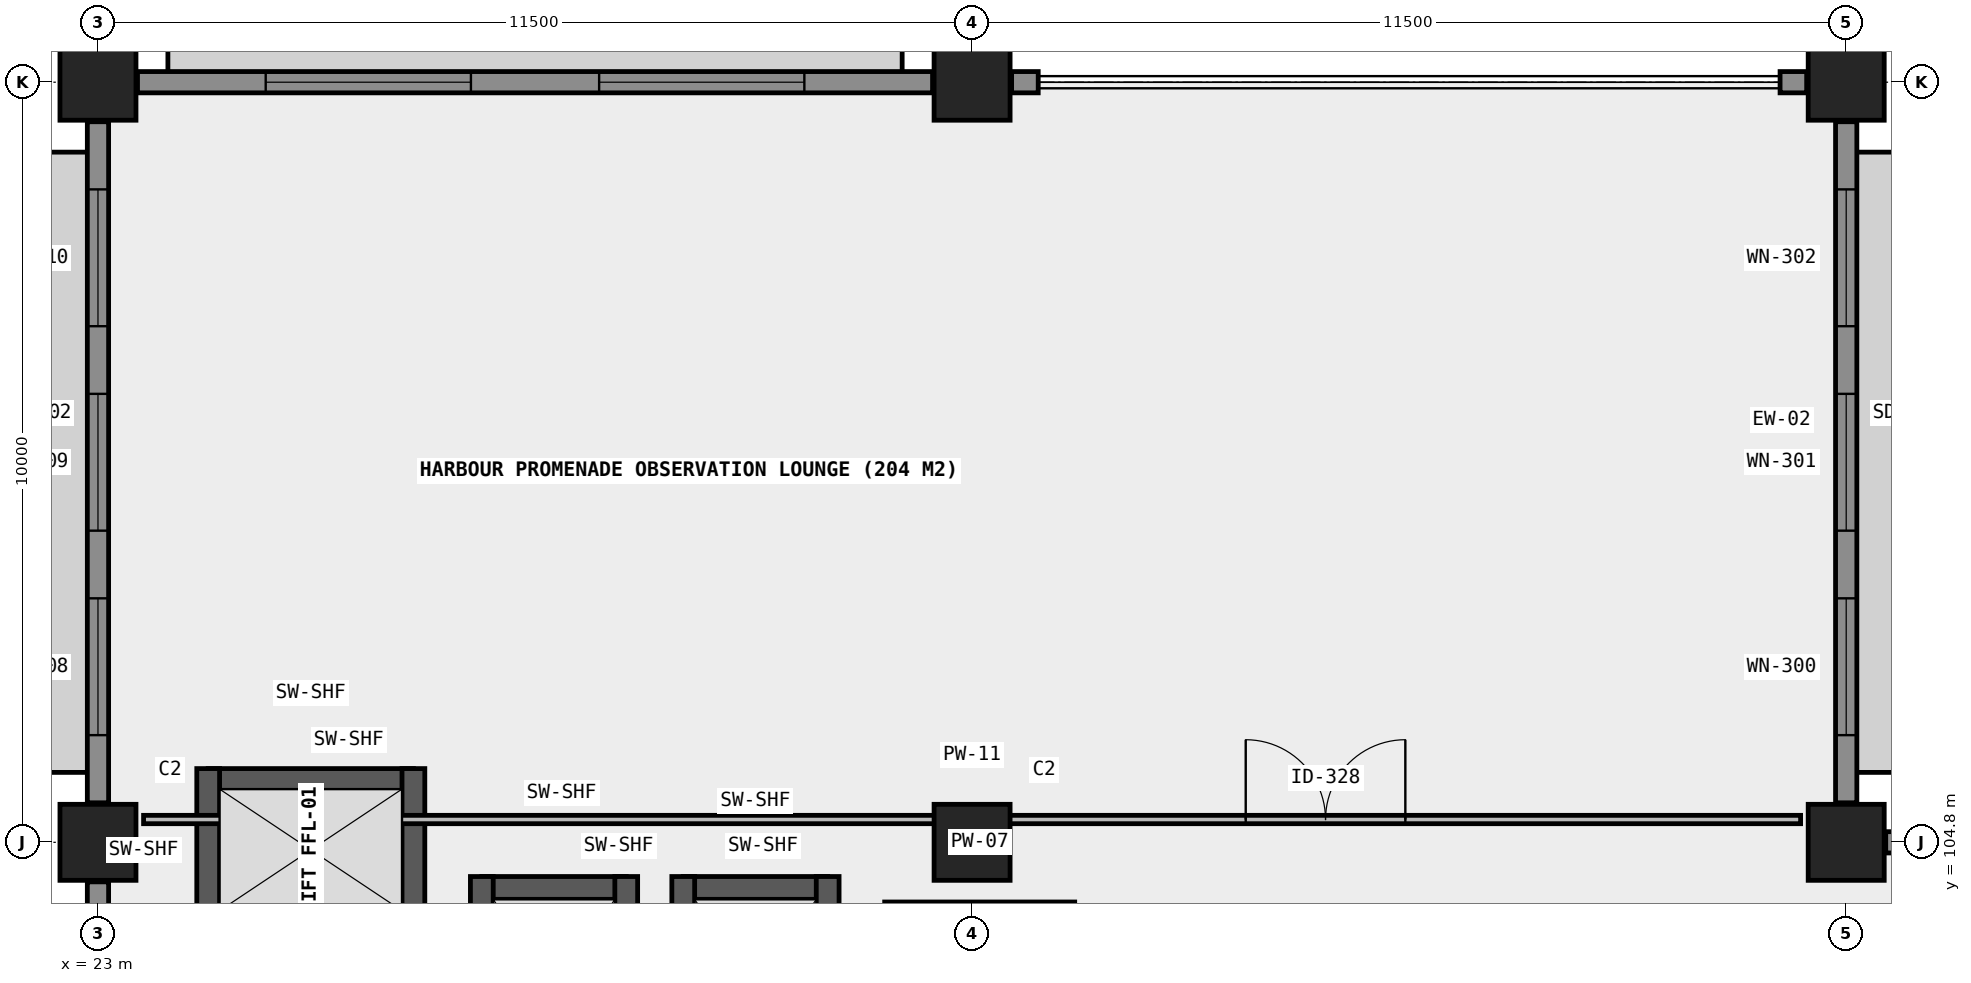
"""IFC4 building model, lengths in metres.
Left out: names, types, materials, properties, quantities, classifications, styles, units other than length and angle.
Written with IfcOpenShell. Run it as: python <this file> out.ifc"""

import sys

from ifc_helpers import new_model, si_unit, direction, frame, frame_2d, origin, origin_2d, place, context, subcontext, project, spatial, rectangle, extrude, element, fill, save


model = new_model("IFC4")
c1 = context("Model", 3, precision=1e-05, world=origin(), true_north=direction((0.0, 1.0)))
c2 = subcontext(c1, "Body", "Model", "MODEL_VIEW")
j1 = project(units=[si_unit("LENGTHUNIT", "METRE"), si_unit("PLANEANGLEUNIT", "RADIAN")], contexts=[c1])
p1 = place(None, origin())
s1 = spatial("IfcSite", under=j1, at=p1, CompositionType="ELEMENT")
p2 = place(p1, origin())
s2 = spatial("IfcBuilding", under=s1, at=p2, CompositionType="ELEMENT")
p3 = place(p2, frame((0.0, 0.0, 13.8)))
s3 = spatial("IfcBuildingStorey", under=s2, at=p3, CompositionType="ELEMENT", Elevation=13.8)
for number, where, z_axis, x_axis in (
    (1, (23.0, 104.8, 0.0), (0.0, 0.0, 1.0), (1.0, 0.0, 0.0)),
    (2, (23.0, 114.8, 0.0), (0.0, 0.0, 1.0), (1.0, 0.0, 0.0)),
    (3, (34.5, 104.8, 0.0), (0.0, 0.0, 1.0), (1.0, 0.0, 0.0)),
    (4, (34.5, 114.8, 0.0), (0.0, 0.0, 1.0), (1.0, 0.0, 0.0)),
    (5, (46.0, 104.8, 0.0), (0.0, 0.0, 1.0), (1.0, 0.0, 0.0)),
    (6, (46.0, 114.8, 0.0), (0.0, 0.0, 1.0), (1.0, 0.0, 0.0)),
):
    element("IfcColumn", number, at=place(p3, frame(where, z_axis=z_axis, x_axis=x_axis)), inside=s3, PredefinedType="COLUMN", context=c2, shape_type="SweptSolid", body=[
        extrude(rectangle(XDim=1.0, YDim=1.0, at=origin_2d()), origin(), (0.0, 0.0, 1.0), 4.5),
    ])
p4 = place(p3, frame((24.45, 105.62, 0.0), z_axis=(0.0, 0.0, 1.0), x_axis=(1.0, 0.0, 0.0)))
e7 = element("IfcWall", 7, at=p4, inside=s3, PredefinedType="SHEAR", context=c2, shape_type="SweptSolid", body=[
    extrude(rectangle(XDim=2.7, YDim=0.3, at=frame_2d((1.35, 0.0))), origin(), (0.0, 0.0, 1.0), 4.5),
])
for number, where, z_axis, x_axis in (
    (8, (24.45, 103.63, 0.0), (0.0, 0.0, 1.0), (0.0, 1.0, 0.0)),
    (9, (27.15, 103.63, 0.0), (0.0, 0.0, 1.0), (0.0, 1.0, 0.0)),
):
    element("IfcWall", number, at=place(p3, frame(where, z_axis=z_axis, x_axis=x_axis)), inside=s3, PredefinedType="SHEAR", context=c2, shape_type="SweptSolid", body=[
        extrude(rectangle(XDim=2.14, YDim=0.3, at=frame_2d((1.07, 0.0))), origin(), (0.0, 0.0, 1.0), 4.5),
    ])
p5 = place(p3, frame((28.05, 104.2, 0.0), z_axis=(0.0, 0.0, 1.0), x_axis=(1.0, 0.0, 0.0)))
e10 = element("IfcWall", 10, at=p5, inside=s3, PredefinedType="SHEAR", context=c2, shape_type="SweptSolid", body=[
    extrude(rectangle(XDim=1.9, YDim=0.3, at=frame_2d((0.95, 0.0))), origin(), (0.0, 0.0, 1.0), 4.5),
])
for number, where, z_axis, x_axis in (
    (11, (28.05, 101.35, 0.0), (0.0, 0.0, 1.0), (0.0, 1.0, 0.0)),
    (12, (29.95, 101.35, 0.0), (0.0, 0.0, 1.0), (0.0, 1.0, 0.0)),
):
    element("IfcWall", number, at=place(p3, frame(where, z_axis=z_axis, x_axis=x_axis)), inside=s3, PredefinedType="SHEAR", context=c2, shape_type="SweptSolid", body=[
        extrude(rectangle(XDim=3.0, YDim=0.3, at=frame_2d((1.5, 0.0))), origin(), (0.0, 0.0, 1.0), 4.5),
    ])
p6 = place(p3, frame((30.7, 104.2, 0.0), z_axis=(0.0, 0.0, 1.0), x_axis=(1.0, 0.0, 0.0)))
e13 = element("IfcWall", 13, at=p6, inside=s3, PredefinedType="SHEAR", context=c2, shape_type="SweptSolid", body=[
    extrude(rectangle(XDim=1.9, YDim=0.3, at=frame_2d((0.95, 0.0))), origin(), (0.0, 0.0, 1.0), 4.5),
])
for number, where, z_axis, x_axis in (
    (14, (30.7, 101.35, 0.0), (0.0, 0.0, 1.0), (0.0, 1.0, 0.0)),
    (15, (32.6, 101.35, 0.0), (0.0, 0.0, 1.0), (0.0, 1.0, 0.0)),
):
    element("IfcWall", number, at=place(p3, frame(where, z_axis=z_axis, x_axis=x_axis)), inside=s3, PredefinedType="SHEAR", context=c2, shape_type="SweptSolid", body=[
        extrude(rectangle(XDim=3.0, YDim=0.3, at=frame_2d((1.5, 0.0))), origin(), (0.0, 0.0, 1.0), 4.5),
    ])
p7 = place(p3, frame((46.52, 104.8, 0.0), z_axis=(0.0, 0.0, 1.0), x_axis=(1.0, 0.0, 0.0)))
e16 = element("IfcWall", 16, at=p7, inside=s3, PredefinedType="SOLIDWALL", context=c2, shape_type="SweptSolid", body=[
    extrude(rectangle(XDim=10.46, YDim=0.28, at=frame_2d((5.23, 0.0))), origin(), (0.0, 0.0, 1.0), 3.45),
])
p8 = place(p7, frame((1.265, 0.0, 0.85)))
e17 = element("IfcOpeningElement", 17, at=p8, cuts=e16, PredefinedType="OPENING", context=c2, shape_type="SweptSolid", body=[
    extrude(rectangle(XDim=1.8, YDim=1.95, at=frame_2d((0.9, 0.975))), frame((0.0, 0.15, 0.0), z_axis=(0.0, -1.0, 0.0), x_axis=(1.0, 0.0, 0.0)), (0.0, 0.0, 1.0), 0.3),
])
p9 = place(p7, frame((4.33, 0.0, 0.85)))
e18 = element("IfcOpeningElement", 18, at=p9, cuts=e16, PredefinedType="OPENING", context=c2, shape_type="SweptSolid", body=[
    extrude(rectangle(XDim=1.8, YDim=1.95, at=frame_2d((0.9, 0.975))), frame((0.0, 0.15, 0.0), z_axis=(0.0, -1.0, 0.0), x_axis=(1.0, 0.0, 0.0)), (0.0, 0.0, 1.0), 0.3),
])
p10 = place(p7, frame((7.395, 0.0, 0.85)))
e19 = element("IfcOpeningElement", 19, at=p10, cuts=e16, PredefinedType="OPENING", context=c2, shape_type="SweptSolid", body=[
    extrude(rectangle(XDim=1.8, YDim=1.95, at=frame_2d((0.9, 0.975))), frame((0.0, 0.15, 0.0), z_axis=(0.0, -1.0, 0.0), x_axis=(1.0, 0.0, 0.0)), (0.0, 0.0, 1.0), 0.3),
])
p11 = place(p3, frame((46.0, 105.32, 0.0), z_axis=(0.0, 0.0, 1.0), x_axis=(0.0, 1.0, 0.0)))
e20 = element("IfcWall", 20, at=p11, inside=s3, PredefinedType="SOLIDWALL", context=c2, shape_type="SweptSolid", body=[
    extrude(rectangle(XDim=8.96, YDim=0.28, at=frame_2d((4.48, 0.0))), origin(), (0.0, 0.0, 1.0), 3.45),
])
p12 = place(p11, frame((0.89, 0.0, 0.85)))
e21 = element("IfcOpeningElement", 21, at=p12, cuts=e20, PredefinedType="OPENING", context=c2, shape_type="SweptSolid", body=[
    extrude(rectangle(XDim=1.8, YDim=1.95, at=frame_2d((0.9, 0.975))), frame((0.0, 0.15, 0.0), z_axis=(0.0, -1.0, 0.0), x_axis=(1.0, 0.0, 0.0)), (0.0, 0.0, 1.0), 0.3),
])
p13 = place(p11, frame((3.58, 0.0, 0.85)))
e22 = element("IfcOpeningElement", 22, at=p13, cuts=e20, PredefinedType="OPENING", context=c2, shape_type="SweptSolid", body=[
    extrude(rectangle(XDim=1.8, YDim=1.95, at=frame_2d((0.9, 0.975))), frame((0.0, 0.15, 0.0), z_axis=(0.0, -1.0, 0.0), x_axis=(1.0, 0.0, 0.0)), (0.0, 0.0, 1.0), 0.3),
])
p14 = place(p11, frame((6.27, 0.0, 0.85)))
e23 = element("IfcOpeningElement", 23, at=p14, cuts=e20, PredefinedType="OPENING", context=c2, shape_type="SweptSolid", body=[
    extrude(rectangle(XDim=1.8, YDim=1.95, at=frame_2d((0.9, 0.975))), frame((0.0, 0.15, 0.0), z_axis=(0.0, -1.0, 0.0), x_axis=(1.0, 0.0, 0.0)), (0.0, 0.0, 1.0), 0.3),
])
p15 = place(p3, frame((23.52, 114.8, 0.0), z_axis=(0.0, 0.0, 1.0), x_axis=(1.0, 0.0, 0.0)))
e24 = element("IfcWall", 24, at=p15, inside=s3, PredefinedType="SOLIDWALL", context=c2, shape_type="SweptSolid", body=[
    extrude(rectangle(XDim=10.46, YDim=0.28, at=frame_2d((5.23, 0.0))), origin(), (0.0, 0.0, 1.0), 3.45),
])
p16 = place(p15, frame((1.687, 0.0, 0.85)))
e25 = element("IfcOpeningElement", 25, at=p16, cuts=e24, PredefinedType="OPENING", context=c2, shape_type="SweptSolid", body=[
    extrude(rectangle(XDim=2.7, YDim=2.15, at=frame_2d((1.35, 1.075))), frame((0.0, 0.15, 0.0), z_axis=(0.0, -1.0, 0.0), x_axis=(1.0, 0.0, 0.0)), (0.0, 0.0, 1.0), 0.3),
])
p17 = place(p15, frame((6.073, 0.0, 0.85)))
e26 = element("IfcOpeningElement", 26, at=p17, cuts=e24, PredefinedType="OPENING", context=c2, shape_type="SweptSolid", body=[
    extrude(rectangle(XDim=2.7, YDim=2.15, at=frame_2d((1.35, 1.075))), frame((0.0, 0.15, 0.0), z_axis=(0.0, -1.0, 0.0), x_axis=(1.0, 0.0, 0.0)), (0.0, 0.0, 1.0), 0.3),
])
for number, where, z_axis, x_axis in (
    (27, (35.02, 114.8, 0.0), (0.0, 0.0, 1.0), (1.0, 0.0, 0.0)),
    (28, (45.13, 114.8, 0.0), (0.0, 0.0, 1.0), (1.0, 0.0, 0.0)),
):
    element("IfcWall", number, at=place(p3, frame(where, z_axis=z_axis, x_axis=x_axis)), inside=s3, PredefinedType="SOLIDWALL", context=c2, shape_type="SweptSolid", body=[
        extrude(rectangle(XDim=0.35, YDim=0.28, at=frame_2d((0.175, 0.0))), origin(), (0.0, 0.0, 1.0), 4.23),
    ])
p18 = place(p3, frame((23.0, 95.32, 0.0), z_axis=(0.0, 0.0, 1.0), x_axis=(0.0, 1.0, 0.0)))
e29 = element("IfcWall", 29, at=p18, inside=s3, PredefinedType="SOLIDWALL", context=c2, shape_type="SweptSolid", body=[
    extrude(rectangle(XDim=8.96, YDim=0.28, at=frame_2d((4.48, 0.0))), origin(), (0.0, 0.0, 1.0), 3.45),
])
p19 = place(p18, frame((0.89, 0.0, 0.85)))
e30 = element("IfcOpeningElement", 30, at=p19, cuts=e29, PredefinedType="OPENING", context=c2, shape_type="SweptSolid", body=[
    extrude(rectangle(XDim=1.8, YDim=1.95, at=frame_2d((0.9, 0.975))), frame((0.0, 0.15, 0.0), z_axis=(0.0, -1.0, 0.0), x_axis=(1.0, 0.0, 0.0)), (0.0, 0.0, 1.0), 0.3),
])
p20 = place(p18, frame((3.58, 0.0, 0.85)))
e31 = element("IfcOpeningElement", 31, at=p20, cuts=e29, PredefinedType="OPENING", context=c2, shape_type="SweptSolid", body=[
    extrude(rectangle(XDim=1.8, YDim=1.95, at=frame_2d((0.9, 0.975))), frame((0.0, 0.15, 0.0), z_axis=(0.0, -1.0, 0.0), x_axis=(1.0, 0.0, 0.0)), (0.0, 0.0, 1.0), 0.3),
])
p21 = place(p18, frame((6.27, 0.0, 0.85)))
e32 = element("IfcOpeningElement", 32, at=p21, cuts=e29, PredefinedType="OPENING", context=c2, shape_type="SweptSolid", body=[
    extrude(rectangle(XDim=1.8, YDim=1.95, at=frame_2d((0.9, 0.975))), frame((0.0, 0.15, 0.0), z_axis=(0.0, -1.0, 0.0), x_axis=(1.0, 0.0, 0.0)), (0.0, 0.0, 1.0), 0.3),
])
p22 = place(p3, frame((23.0, 105.32, 0.0), z_axis=(0.0, 0.0, 1.0), x_axis=(0.0, 1.0, 0.0)))
e33 = element("IfcWall", 33, at=p22, inside=s3, PredefinedType="SOLIDWALL", context=c2, shape_type="SweptSolid", body=[
    extrude(rectangle(XDim=8.96, YDim=0.28, at=frame_2d((4.48, 0.0))), origin(), (0.0, 0.0, 1.0), 3.45),
])
p23 = place(p22, frame((0.89, 0.0, 0.85)))
e34 = element("IfcOpeningElement", 34, at=p23, cuts=e33, PredefinedType="OPENING", context=c2, shape_type="SweptSolid", body=[
    extrude(rectangle(XDim=1.8, YDim=1.95, at=frame_2d((0.9, 0.975))), frame((0.0, 0.15, 0.0), z_axis=(0.0, -1.0, 0.0), x_axis=(1.0, 0.0, 0.0)), (0.0, 0.0, 1.0), 0.3),
])
p24 = place(p22, frame((3.58, 0.0, 0.85)))
e35 = element("IfcOpeningElement", 35, at=p24, cuts=e33, PredefinedType="OPENING", context=c2, shape_type="SweptSolid", body=[
    extrude(rectangle(XDim=1.8, YDim=1.95, at=frame_2d((0.9, 0.975))), frame((0.0, 0.15, 0.0), z_axis=(0.0, -1.0, 0.0), x_axis=(1.0, 0.0, 0.0)), (0.0, 0.0, 1.0), 0.3),
])
p25 = place(p22, frame((6.27, 0.0, 0.85)))
e36 = element("IfcOpeningElement", 36, at=p25, cuts=e33, PredefinedType="OPENING", context=c2, shape_type="SweptSolid", body=[
    extrude(rectangle(XDim=1.8, YDim=1.95, at=frame_2d((0.9, 0.975))), frame((0.0, 0.15, 0.0), z_axis=(0.0, -1.0, 0.0), x_axis=(1.0, 0.0, 0.0)), (0.0, 0.0, 1.0), 0.3),
])
p26 = place(p3, frame((33.35, 103.95, 0.0), z_axis=(0.0, 0.0, 1.0), x_axis=(1.0, 0.0, 0.0)))
e37 = element("IfcWall", 37, at=p26, inside=s3, PredefinedType="PLUMBINGWALL", context=c2, shape_type="SweptSolid", body=[
    extrude(rectangle(XDim=2.5, YDim=0.13, at=frame_2d((1.25, 0.0))), origin(), (0.0, 0.0, 1.0), 4.22),
])
p27 = place(p3, frame((23.6, 105.1, 0.0), z_axis=(0.0, 0.0, 1.0), x_axis=(1.0, 0.0, 0.0)))
e38 = element("IfcWall", 38, at=p27, inside=s3, PredefinedType="MOVABLE", context=c2, shape_type="SweptSolid", body=[
    extrude(rectangle(XDim=21.8, YDim=0.11, at=frame_2d((10.9, 0.0))), origin(), (0.0, 0.0, 1.0), 4.22),
])
p28 = place(p27, frame((14.5, 0.0, 0.0)))
e39 = element("IfcOpeningElement", 39, at=p28, cuts=e38, PredefinedType="OPENING", context=c2, shape_type="SweptSolid", body=[
    extrude(rectangle(XDim=2.1, YDim=2.35, at=frame_2d((1.05, 1.175))), frame((0.0, 0.065, 0.0), z_axis=(0.0, -1.0, 0.0), x_axis=(1.0, 0.0, 0.0)), (0.0, 0.0, 1.0), 0.13),
])
p29 = place(p12, origin())
e40 = element("IfcWindow", 40, at=p29, inside=s3, PartitioningType="SINGLE_PANEL", PredefinedType="WINDOW", context=c2, shape_type="SweptSolid", body=[
    extrude(rectangle(XDim=1.8, YDim=1.95, at=frame_2d((0.9, 0.975))), frame((0.0, 0.03, 0.0), z_axis=(0.0, -1.0, 0.0), x_axis=(1.0, 0.0, 0.0)), (0.0, 0.0, 1.0), 0.06),
])
fill(e21, e40)
p30 = place(p13, origin())
e41 = element("IfcWindow", 41, at=p30, inside=s3, PartitioningType="SINGLE_PANEL", PredefinedType="WINDOW", context=c2, shape_type="SweptSolid", body=[
    extrude(rectangle(XDim=1.8, YDim=1.95, at=frame_2d((0.9, 0.975))), frame((0.0, 0.03, 0.0), z_axis=(0.0, -1.0, 0.0), x_axis=(1.0, 0.0, 0.0)), (0.0, 0.0, 1.0), 0.06),
])
fill(e22, e41)
p31 = place(p14, origin())
e42 = element("IfcWindow", 42, at=p31, inside=s3, PartitioningType="SINGLE_PANEL", PredefinedType="WINDOW", context=c2, shape_type="SweptSolid", body=[
    extrude(rectangle(XDim=1.8, YDim=1.95, at=frame_2d((0.9, 0.975))), frame((0.0, 0.03, 0.0), z_axis=(0.0, -1.0, 0.0), x_axis=(1.0, 0.0, 0.0)), (0.0, 0.0, 1.0), 0.06),
])
fill(e23, e42)
p32 = place(p16, origin())
e43 = element("IfcWindow", 43, at=p32, inside=s3, PartitioningType="SINGLE_PANEL", PredefinedType="WINDOW", context=c2, shape_type="SweptSolid", body=[
    extrude(rectangle(XDim=2.7, YDim=2.15, at=frame_2d((1.35, 1.075))), frame((0.0, 0.03, 0.0), z_axis=(0.0, -1.0, 0.0), x_axis=(1.0, 0.0, 0.0)), (0.0, 0.0, 1.0), 0.06),
])
fill(e25, e43)
p33 = place(p17, origin())
e44 = element("IfcWindow", 44, at=p33, inside=s3, PartitioningType="SINGLE_PANEL", PredefinedType="WINDOW", context=c2, shape_type="SweptSolid", body=[
    extrude(rectangle(XDim=2.7, YDim=2.15, at=frame_2d((1.35, 1.075))), frame((0.0, 0.03, 0.0), z_axis=(0.0, -1.0, 0.0), x_axis=(1.0, 0.0, 0.0)), (0.0, 0.0, 1.0), 0.06),
])
fill(e26, e44)
p34 = place(p23, origin())
e45 = element("IfcWindow", 45, at=p34, inside=s3, PartitioningType="SINGLE_PANEL", PredefinedType="WINDOW", context=c2, shape_type="SweptSolid", body=[
    extrude(rectangle(XDim=1.8, YDim=1.95, at=frame_2d((0.9, 0.975))), frame((0.0, 0.03, 0.0), z_axis=(0.0, -1.0, 0.0), x_axis=(1.0, 0.0, 0.0)), (0.0, 0.0, 1.0), 0.06),
])
fill(e34, e45)
p35 = place(p24, origin())
e46 = element("IfcWindow", 46, at=p35, inside=s3, PartitioningType="SINGLE_PANEL", PredefinedType="WINDOW", context=c2, shape_type="SweptSolid", body=[
    extrude(rectangle(XDim=1.8, YDim=1.95, at=frame_2d((0.9, 0.975))), frame((0.0, 0.03, 0.0), z_axis=(0.0, -1.0, 0.0), x_axis=(1.0, 0.0, 0.0)), (0.0, 0.0, 1.0), 0.06),
])
fill(e35, e46)
p36 = place(p25, origin())
e47 = element("IfcWindow", 47, at=p36, inside=s3, PartitioningType="SINGLE_PANEL", PredefinedType="WINDOW", context=c2, shape_type="SweptSolid", body=[
    extrude(rectangle(XDim=1.8, YDim=1.95, at=frame_2d((0.9, 0.975))), frame((0.0, 0.03, 0.0), z_axis=(0.0, -1.0, 0.0), x_axis=(1.0, 0.0, 0.0)), (0.0, 0.0, 1.0), 0.06),
])
fill(e36, e47)
p37 = place(p28, origin())
e48 = element("IfcDoor", 48, at=p37, inside=s3, OperationType="DOUBLE_DOOR_SINGLE_SWING", PredefinedType="DOOR", context=c2, shape_type="SweptSolid", body=[
    extrude(rectangle(XDim=2.1, YDim=2.35, at=frame_2d((1.05, 1.175))), frame((0.0, 0.025, 0.0), z_axis=(0.0, -1.0, 0.0), x_axis=(1.0, 0.0, 0.0)), (0.0, 0.0, 1.0), 0.05),
])
fill(e39, e48)
save(model, sys.argv[1])
